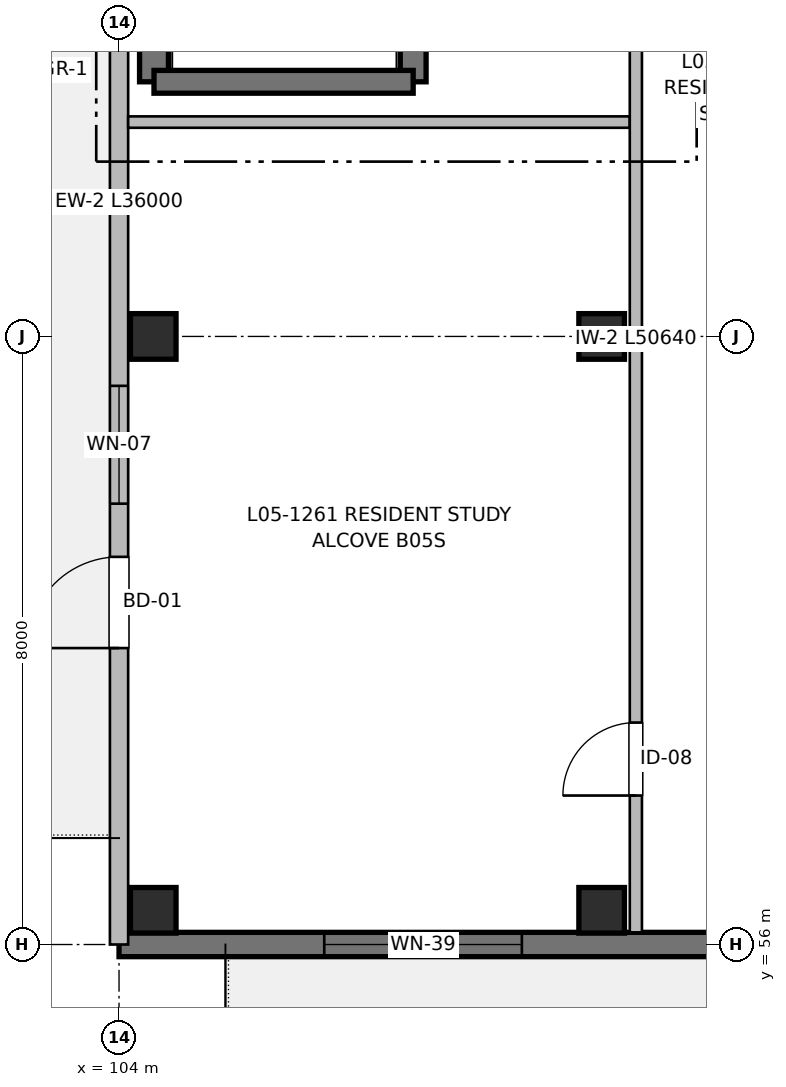
"""IFC4 building model, lengths in metres.
Left out: names, types, materials, properties, quantities, classifications, styles, units other than length and angle.
Written with IfcOpenShell. Run it as: python <this file> out.ifc"""

import sys

from ifc_helpers import new_model, si_unit, direction, frame, frame_2d, origin, origin_2d, place, context, subcontext, project, spatial, rectangle, extrude, element, fill, save


model = new_model("IFC4")
c1 = context("Model", 3, precision=1e-05, world=origin(), true_north=direction((0.0, 1.0)))
c2 = subcontext(c1, "Body", "Model", "MODEL_VIEW")
j1 = project(units=[si_unit("LENGTHUNIT", "METRE"), si_unit("PLANEANGLEUNIT", "RADIAN")], contexts=[c1])
p1 = place(None, origin())
s1 = spatial("IfcSite", under=j1, at=p1, CompositionType="ELEMENT")
p2 = place(p1, origin())
s2 = spatial("IfcBuilding", under=s1, at=p2, CompositionType="ELEMENT")
p3 = place(p2, frame((0.0, 0.0, 16.96)))
s3 = spatial("IfcBuildingStorey", under=s2, at=p3, CompositionType="ELEMENT", Elevation=16.96)
for number, where, z_axis, x_axis in (
    (1, (104.45, 56.45, 0.0), (0.0, 0.0, 1.0), (1.0, 0.0, 0.0)),
    (2, (104.45, 64.0, 0.0), (0.0, 0.0, 1.0), (1.0, 0.0, 0.0)),
    (3, (110.35, 56.45, 0.0), (0.0, 0.0, 1.0), (1.0, 0.0, 0.0)),
    (4, (110.35, 64.0, 0.0), (0.0, 0.0, 1.0), (1.0, 0.0, 0.0)),
):
    element("IfcColumn", number, at=place(p3, frame(where, z_axis=z_axis, x_axis=x_axis)), inside=s3, PredefinedType="COLUMN", context=c2, shape_type="SweptSolid", body=[
        extrude(rectangle(XDim=0.6, YDim=0.6, at=origin_2d()), origin(), (0.0, 0.0, 1.0), 3.2),
    ])
p4 = place(p3, frame((104.46, 67.35, 0.0), z_axis=(0.0, 0.0, 1.0), x_axis=(0.0, 1.0, 0.0)))
e5 = element("IfcWall", 5, at=p4, inside=s3, PredefinedType="SHEAR", context=c2, shape_type="SweptSolid", body=[
    extrude(rectangle(XDim=12.45, YDim=0.38, at=frame_2d((6.225, 0.0))), origin(), (0.0, 0.0, 1.0), 3.2),
])
p5 = place(p4, frame((2.2, 0.0, 0.97)))
e6 = element("IfcOpeningElement", 6, at=p5, cuts=e5, PredefinedType="OPENING", context=c2, shape_type="SweptSolid", body=[
    extrude(rectangle(XDim=0.95, YDim=1.25, at=frame_2d((0.475, 0.625))), frame((0.0, 0.2, 0.0), z_axis=(0.0, -1.0, 0.0), x_axis=(1.0, 0.0, 0.0)), (0.0, 0.0, 1.0), 0.4),
])
p6 = place(p3, frame((107.87, 79.8, 0.0), z_axis=(0.0, 0.0, 1.0), x_axis=(0.0, -1.0, 0.0)))
e7 = element("IfcWall", 7, at=p6, inside=s3, PredefinedType="SHEAR", context=c2, shape_type="SweptSolid", body=[
    extrude(rectangle(XDim=12.45, YDim=0.34, at=frame_2d((6.225, 0.0))), origin(), (0.0, 0.0, 1.0), 3.2),
])
p7 = place(p6, frame((10.85, 0.0, 0.0)))
e8 = element("IfcOpeningElement", 8, at=p7, cuts=e7, PredefinedType="OPENING", context=c2, shape_type="SweptSolid", body=[
    extrude(rectangle(XDim=1.05, YDim=2.15, at=frame_2d((0.525, 1.075))), frame((0.0, 0.18, 0.0), z_axis=(0.0, -1.0, 0.0), x_axis=(1.0, 0.0, 0.0)), (0.0, 0.0, 1.0), 0.36),
])
p8 = place(p3, frame((107.87, 67.35, 0.0), z_axis=(0.0, 0.0, 1.0), x_axis=(-1.0, 0.0, 0.0)))
e9 = element("IfcWall", 9, at=p8, inside=s3, PredefinedType="SHEAR", context=c2, shape_type="SweptSolid", body=[
    extrude(rectangle(XDim=3.41, YDim=0.3, at=frame_2d((1.705, 0.0))), origin(), (0.0, 0.0, 1.0), 3.2),
])
p9 = place(p3, frame((120.0, 56.0, 0.0), z_axis=(0.0, 0.0, 1.0), x_axis=(-1.0, 0.0, 0.0)))
e10 = element("IfcWall", 10, at=p9, inside=s3, PredefinedType="SHEAR", context=c2, shape_type="SweptSolid", body=[
    extrude(rectangle(XDim=16.0, YDim=0.32, at=frame_2d((8.0, 0.0))), origin(), (0.0, 0.0, 1.0), 2.98),
])
p10 = place(p9, frame((2.55, 0.0, 0.0)))
e11 = element("IfcOpeningElement", 11, at=p10, cuts=e10, PredefinedType="OPENING", context=c2, shape_type="SweptSolid", body=[
    extrude(rectangle(XDim=1.2, YDim=2.2, at=frame_2d((0.6, 1.1))), frame((0.0, 0.17, 0.0), z_axis=(0.0, -1.0, 0.0), x_axis=(1.0, 0.0, 0.0)), (0.0, 0.0, 1.0), 0.34),
])
p11 = place(p9, frame((4.85, 0.0, 0.82)))
e12 = element("IfcOpeningElement", 12, at=p11, cuts=e10, PredefinedType="OPENING", context=c2, shape_type="SweptSolid", body=[
    extrude(rectangle(XDim=1.55, YDim=1.4, at=frame_2d((0.775, 0.7))), frame((0.0, 0.17, 0.0), z_axis=(0.0, -1.0, 0.0), x_axis=(1.0, 0.0, 0.0)), (0.0, 0.0, 1.0), 0.34),
])
p12 = place(p9, frame((10.7, 0.0, 0.67)))
e13 = element("IfcOpeningElement", 13, at=p12, cuts=e10, PredefinedType="OPENING", context=c2, shape_type="SweptSolid", body=[
    extrude(rectangle(XDim=2.6, YDim=1.55, at=frame_2d((1.3, 0.775))), frame((0.0, 0.17, 0.0), z_axis=(0.0, -1.0, 0.0), x_axis=(1.0, 0.0, 0.0)), (0.0, 0.0, 1.0), 0.34),
])
p13 = place(p3, frame((104.0, 56.0, 0.0), z_axis=(0.0, 0.0, 1.0), x_axis=(0.0, 1.0, 0.0)))
e14 = element("IfcWall", 14, at=p13, inside=s3, PredefinedType="SOLIDWALL", context=c2, shape_type="SweptSolid", body=[
    extrude(rectangle(XDim=36.0, YDim=0.24, at=frame_2d((18.0, 0.0))), origin(), (0.0, 0.0, 1.0), 2.98),
])
p14 = place(p13, frame((3.9, 0.0, 0.0)))
e15 = element("IfcOpeningElement", 15, at=p14, cuts=e14, PredefinedType="OPENING", context=c2, shape_type="SweptSolid", body=[
    extrude(rectangle(XDim=1.2, YDim=2.2, at=frame_2d((0.6, 1.1))), frame((0.0, 0.13, 0.0), z_axis=(0.0, -1.0, 0.0), x_axis=(1.0, 0.0, 0.0)), (0.0, 0.0, 1.0), 0.26),
])
p15 = place(p13, frame((5.8, 0.0, 0.82)))
e16 = element("IfcOpeningElement", 16, at=p15, cuts=e14, PredefinedType="OPENING", context=c2, shape_type="SweptSolid", body=[
    extrude(rectangle(XDim=1.55, YDim=1.4, at=frame_2d((0.775, 0.7))), frame((0.0, 0.13, 0.0), z_axis=(0.0, -1.0, 0.0), x_axis=(1.0, 0.0, 0.0)), (0.0, 0.0, 1.0), 0.26),
])
p16 = place(p13, frame((12.2, 0.0, 0.67)))
e17 = element("IfcOpeningElement", 17, at=p16, cuts=e14, PredefinedType="OPENING", context=c2, shape_type="SweptSolid", body=[
    extrude(rectangle(XDim=2.6, YDim=1.55, at=frame_2d((1.3, 0.775))), frame((0.0, 0.13, 0.0), z_axis=(0.0, -1.0, 0.0), x_axis=(1.0, 0.0, 0.0)), (0.0, 0.0, 1.0), 0.26),
])
p17 = place(p13, frame((19.86, 0.0, 0.72)))
e18 = element("IfcOpeningElement", 18, at=p17, cuts=e14, PredefinedType="OPENING", context=c2, shape_type="SweptSolid", body=[
    extrude(rectangle(XDim=1.68, YDim=1.5, at=frame_2d((0.84, 0.75))), frame((0.0, 0.13, 0.0), z_axis=(0.0, -1.0, 0.0), x_axis=(1.0, 0.0, 0.0)), (0.0, 0.0, 1.0), 0.26),
])
p18 = place(p13, frame((30.6, 0.0, 0.72)))
e19 = element("IfcOpeningElement", 19, at=p18, cuts=e14, PredefinedType="OPENING", context=c2, shape_type="SweptSolid", body=[
    extrude(rectangle(XDim=1.8, YDim=1.5, at=frame_2d((0.9, 0.75))), frame((0.0, 0.13, 0.0), z_axis=(0.0, -1.0, 0.0), x_axis=(1.0, 0.0, 0.0)), (0.0, 0.0, 1.0), 0.26),
])
p19 = place(p3, frame((104.12, 66.82, 0.0), z_axis=(0.0, 0.0, 1.0), x_axis=(1.0, 0.0, 0.0)))
e20 = element("IfcWall", 20, at=p19, inside=s3, PredefinedType="PARTITIONING", context=c2, shape_type="SweptSolid", body=[
    extrude(rectangle(XDim=6.6, YDim=0.15, at=frame_2d((3.3, 0.0))), origin(), (0.0, 0.0, 1.0), 2.935),
])
p20 = place(p3, frame((110.8, 56.16, 0.0), z_axis=(0.0, 0.0, 1.0), x_axis=(0.0, 1.0, 0.0)))
e21 = element("IfcWall", 21, at=p20, inside=s3, PredefinedType="PARTITIONING", context=c2, shape_type="SweptSolid", body=[
    extrude(rectangle(XDim=50.64, YDim=0.16, at=frame_2d((25.32, 0.0))), origin(), (0.0, 0.0, 1.0), 2.935),
])
p21 = place(p20, frame((12.84, 0.0, 0.0)))
e22 = element("IfcOpeningElement", 22, at=p21, cuts=e21, PredefinedType="OPENING", context=c2, shape_type="SweptSolid", body=[
    extrude(rectangle(XDim=1.1, YDim=2.15, at=frame_2d((0.55, 1.075))), frame((0.0, 0.09, 0.0), z_axis=(0.0, -1.0, 0.0), x_axis=(1.0, 0.0, 0.0)), (0.0, 0.0, 1.0), 0.18),
])
p22 = place(p20, frame((19.24, 0.0, 0.0)))
e23 = element("IfcOpeningElement", 23, at=p22, cuts=e21, PredefinedType="OPENING", context=c2, shape_type="SweptSolid", body=[
    extrude(rectangle(XDim=1.6, YDim=2.15, at=frame_2d((0.8, 1.075))), frame((0.0, 0.09, 0.0), z_axis=(0.0, -1.0, 0.0), x_axis=(1.0, 0.0, 0.0)), (0.0, 0.0, 1.0), 0.18),
])
p23 = place(p20, frame((1.8, 0.0, 0.0)))
e24 = element("IfcOpeningElement", 24, at=p23, cuts=e21, PredefinedType="OPENING", context=c2, shape_type="SweptSolid", body=[
    extrude(rectangle(XDim=0.96, YDim=2.15, at=frame_2d((0.48, 1.075))), frame((0.0, 0.09, 0.0), z_axis=(0.0, -1.0, 0.0), x_axis=(1.0, 0.0, 0.0)), (0.0, 0.0, 1.0), 0.18),
])
p24 = place(p20, frame((32.645, 0.0, 0.0)))
e25 = element("IfcOpeningElement", 25, at=p24, cuts=e21, PredefinedType="OPENING", context=c2, shape_type="SweptSolid", body=[
    extrude(rectangle(XDim=0.98, YDim=2.15, at=frame_2d((0.49, 1.075))), frame((0.0, 0.09, 0.0), z_axis=(0.0, -1.0, 0.0), x_axis=(1.0, 0.0, 0.0)), (0.0, 0.0, 1.0), 0.18),
])
p25 = place(p20, frame((41.255, 0.0, 0.0)))
e26 = element("IfcOpeningElement", 26, at=p25, cuts=e21, PredefinedType="OPENING", context=c2, shape_type="SweptSolid", body=[
    extrude(rectangle(XDim=0.98, YDim=2.15, at=frame_2d((0.49, 1.075))), frame((0.0, 0.09, 0.0), z_axis=(0.0, -1.0, 0.0), x_axis=(1.0, 0.0, 0.0)), (0.0, 0.0, 1.0), 0.18),
])
p26 = place(p12, origin())
e27 = element("IfcWindow", 27, at=p26, inside=s3, PartitioningType="SINGLE_PANEL", PredefinedType="WINDOW", context=c2, shape_type="SweptSolid", body=[
    extrude(rectangle(XDim=2.6, YDim=1.55, at=frame_2d((1.3, 0.775))), frame((0.0, 0.03, 0.0), z_axis=(0.0, -1.0, 0.0), x_axis=(1.0, 0.0, 0.0)), (0.0, 0.0, 1.0), 0.06),
])
fill(e13, e27)
p27 = place(p14, origin())
e28 = element("IfcDoor", 28, at=p27, inside=s3, OperationType="SINGLE_SWING_LEFT", PredefinedType="DOOR", context=c2, shape_type="SweptSolid", body=[
    extrude(rectangle(XDim=1.2, YDim=2.2, at=frame_2d((0.6, 1.1))), frame((0.0, 0.025, 0.0), z_axis=(0.0, -1.0, 0.0), x_axis=(1.0, 0.0, 0.0)), (0.0, 0.0, 1.0), 0.05),
])
fill(e15, e28)
p28 = place(p15, origin())
e29 = element("IfcWindow", 29, at=p28, inside=s3, PartitioningType="SINGLE_PANEL", PredefinedType="WINDOW", context=c2, shape_type="SweptSolid", body=[
    extrude(rectangle(XDim=1.55, YDim=1.4, at=frame_2d((0.775, 0.7))), frame((0.0, 0.03, 0.0), z_axis=(0.0, -1.0, 0.0), x_axis=(1.0, 0.0, 0.0)), (0.0, 0.0, 1.0), 0.06),
])
fill(e16, e29)
p29 = place(p23, origin())
e30 = element("IfcDoor", 30, at=p29, inside=s3, OperationType="SINGLE_SWING_LEFT", PredefinedType="DOOR", context=c2, shape_type="SweptSolid", body=[
    extrude(rectangle(XDim=0.96, YDim=2.15, at=frame_2d((0.48, 1.075))), frame((0.0, 0.025, 0.0), z_axis=(0.0, -1.0, 0.0), x_axis=(1.0, 0.0, 0.0)), (0.0, 0.0, 1.0), 0.05),
])
fill(e24, e30)
save(model, sys.argv[1])
